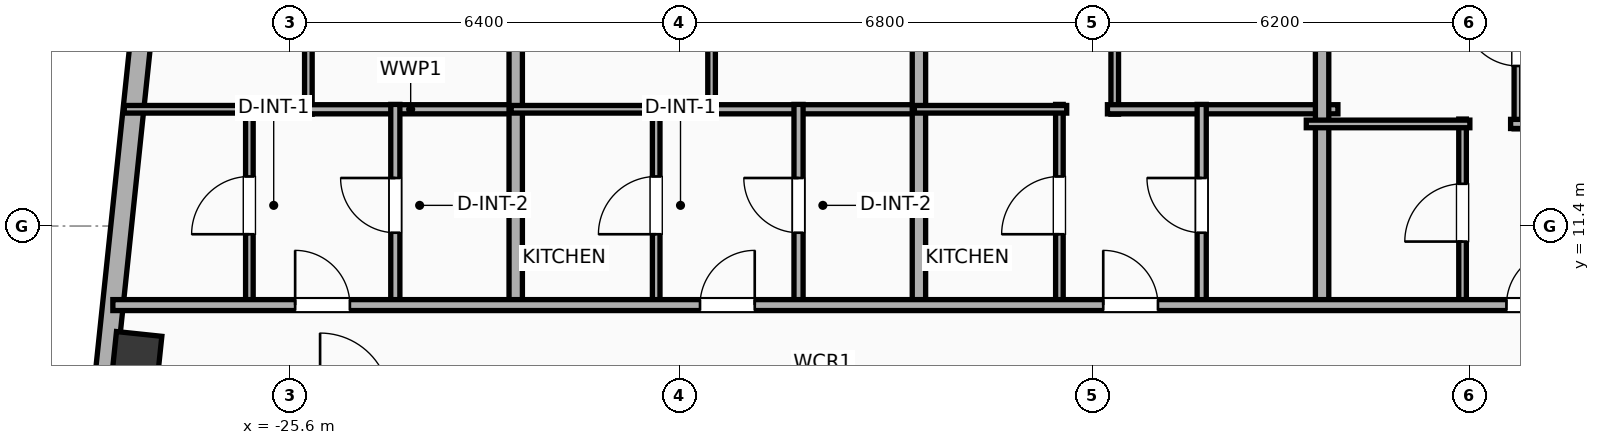
"""IFC4 building model, lengths in metres.
Left out: names, types, materials, properties, quantities, classifications, styles, units other than length and angle.
Written with IfcOpenShell. Run it as: python <this file> out.ifc"""

import sys

from ifc_helpers import new_model, si_unit, direction, frame, frame_2d, origin, origin_2d, place, context, subcontext, project, spatial, rectangle, hollow_rectangle, extrude, element, fill, save


model = new_model("IFC4")
c1 = context("Model", 3, precision=1e-05, world=origin(), true_north=direction((0.0, 1.0)))
c2 = subcontext(c1, "Body", "Model", "MODEL_VIEW")
j1 = project(units=[si_unit("LENGTHUNIT", "METRE"), si_unit("PLANEANGLEUNIT", "RADIAN")], contexts=[c1])
p1 = place(None, origin())
s1 = spatial("IfcSite", under=j1, at=p1, CompositionType="ELEMENT")
p2 = place(p1, origin())
s2 = spatial("IfcBuilding", under=s1, at=p2, CompositionType="ELEMENT")
p3 = place(p2, frame((0.0, 0.0, 299.0)))
s3 = spatial("IfcBuildingStorey", under=s2, at=p3, CompositionType="ELEMENT", Elevation=299.0)
p4 = place(p3, frame((-28.123, 9.252, 0.0), z_axis=(0.0, 0.0, 1.0), x_axis=(0.994521895368, -0.104528463268, 0.0)))
e1 = element("IfcColumn", 1, at=p4, inside=s3, PredefinedType="COLUMN", context=c2, shape_type="SweptSolid", body=[
    extrude(hollow_rectangle(XDim=0.75, YDim=0.75, WallThickness=0.025, at=origin_2d()), origin(), (0.0, 0.0, 1.0), 3.9),
])
p5 = place(p3, frame((-30.87, -12.296, 0.0), z_axis=(0.0, 0.0, 1.0), x_axis=(0.104533282919, 0.994521388791, 0.0)))
e2 = element("IfcWall", 2, at=p5, inside=s3, PredefinedType="ELEMENTEDWALL", context=c2, shape_type="SweptSolid", body=[
    extrude(rectangle(XDim=30.366, YDim=0.34, at=frame_2d((15.183, 0.0))), origin(), (0.0, 0.0, 1.0), 3.635),
])
p6 = place(p5, frame((5.442, 0.0, 0.65)))
e3 = element("IfcOpeningElement", 3, at=p6, cuts=e2, PredefinedType="OPENING", context=c2, shape_type="SweptSolid", body=[
    extrude(rectangle(XDim=2.6, YDim=2.45, at=frame_2d((1.3, 1.225))), frame((0.0, 0.18, 0.0), z_axis=(0.0, -1.0, 0.0), x_axis=(1.0, 0.0, 0.0)), (0.0, 0.0, 1.0), 0.36),
])
p7 = place(p5, frame((27.017, 0.0, 0.75)))
e4 = element("IfcOpeningElement", 4, at=p7, cuts=e2, PredefinedType="OPENING", context=c2, shape_type="SweptSolid", body=[
    extrude(rectangle(XDim=1.2, YDim=2.05, at=frame_2d((0.6, 1.025))), frame((0.0, 0.18, 0.0), z_axis=(0.0, -1.0, 0.0), x_axis=(1.0, 0.0, 0.0)), (0.0, 0.0, 1.0), 0.36),
])
p8 = place(p5, frame((16.135, 0.0, 0.75)))
e5 = element("IfcOpeningElement", 5, at=p8, cuts=e2, PredefinedType="OPENING", context=c2, shape_type="SweptSolid", body=[
    extrude(rectangle(XDim=1.2, YDim=2.05, at=frame_2d((0.6, 1.025))), frame((0.0, 0.18, 0.0), z_axis=(0.0, -1.0, 0.0), x_axis=(1.0, 0.0, 0.0)), (0.0, 0.0, 1.0), 0.36),
])
p9 = place(p3, frame((-25.301, 13.24, 0.0), z_axis=(0.0, 0.0, 1.0), x_axis=(0.0, 1.0, 0.0)))
e6 = element("IfcWall", 6, at=p9, inside=s3, PredefinedType="PARTITIONING", context=c2, shape_type="SweptSolid", body=[
    extrude(rectangle(XDim=7.751, YDim=0.125, at=frame_2d((3.875, 0.0))), origin(), (0.0, 0.0, 1.0), 3.635),
])
p10 = place(p9, frame((1.41, 0.0, 0.0)))
e7 = element("IfcOpeningElement", 7, at=p10, cuts=e6, PredefinedType="OPENING", context=c2, shape_type="SweptSolid", body=[
    extrude(rectangle(XDim=0.9, YDim=2.05, at=frame_2d((0.45, 1.025))), frame((0.0, 0.073, 0.0), z_axis=(0.0, -1.0, 0.0), x_axis=(1.0, 0.0, 0.0)), (0.0, 0.0, 1.0), 0.145),
])
p11 = place(p3, frame((-25.421, 13.32, 0.0), z_axis=(0.0, 0.0, 1.0), x_axis=(1.0, 0.0, 0.0)))
e8 = element("IfcWall", 8, at=p11, inside=s3, PredefinedType="PLUMBINGWALL", context=c2, shape_type="SweptSolid", body=[
    extrude(rectangle(XDim=3.605, YDim=0.15, at=frame_2d((1.802, 0.0))), origin(), (0.0, 0.0, 1.0), 3.635),
])
p12 = place(p3, frame((-26.271, 10.08, 0.0), z_axis=(0.0, 0.0, 1.0), x_axis=(0.0, 1.0, 0.0)))
e9 = element("IfcWall", 9, at=p12, inside=s3, PredefinedType="PARTITIONING", context=c2, shape_type="SweptSolid", body=[
    extrude(rectangle(XDim=3.32, YDim=0.125, at=frame_2d((1.66, 0.0))), origin(), (0.0, 0.0, 1.0), 3.635),
])
p13 = place(p12, frame((1.185, 0.0, 0.0)))
e10 = element("IfcOpeningElement", 10, at=p13, cuts=e9, PredefinedType="OPENING", context=c2, shape_type="SweptSolid", body=[
    extrude(rectangle(XDim=0.95, YDim=2.05, at=frame_2d((0.475, 1.025))), frame((0.0, 0.073, 0.0), z_axis=(0.0, -1.0, 0.0), x_axis=(1.0, 0.0, 0.0)), (0.0, 0.0, 1.0), 0.145),
])
p14 = place(p3, frame((-28.329, 13.32, 0.0), z_axis=(0.0, 0.0, 1.0), x_axis=(1.0, 0.0, 0.0)))
e11 = element("IfcWall", 11, at=p14, inside=s3, PredefinedType="PARTITIONING", context=c2, shape_type="SweptSolid", body=[
    extrude(rectangle(XDim=2.178, YDim=0.125, at=frame_2d((1.089, 0.0))), origin(), (0.0, 0.0, 1.0), 3.635),
])
p15 = place(p3, frame((-23.871, 10.08, 0.0), z_axis=(0.0, 0.0, 1.0), x_axis=(0.0, 1.0, 0.0)))
e12 = element("IfcWall", 12, at=p15, inside=s3, PredefinedType="PLUMBINGWALL", context=c2, shape_type="SweptSolid", body=[
    extrude(rectangle(XDim=3.32, YDim=0.15, at=frame_2d((1.66, 0.0))), origin(), (0.0, 0.0, 1.0), 3.635),
])
p16 = place(p15, frame((1.21, 0.0, 0.0)))
e13 = element("IfcOpeningElement", 13, at=p16, cuts=e12, PredefinedType="OPENING", context=c2, shape_type="SweptSolid", body=[
    extrude(rectangle(XDim=0.9, YDim=2.05, at=frame_2d((0.45, 1.025))), frame((0.0, 0.085, 0.0), z_axis=(0.0, -1.0, 0.0), x_axis=(1.0, 0.0, 0.0)), (0.0, 0.0, 1.0), 0.17),
])
p17 = place(p3, frame((-21.891, 10.02, 0.0), z_axis=(0.0, 0.0, 1.0), x_axis=(0.0, 1.0, 0.0)))
e14 = element("IfcWall", 14, at=p17, inside=s3, PredefinedType="PARTITIONING", context=c2, shape_type="SweptSolid", body=[
    extrude(rectangle(XDim=10.74, YDim=0.22, at=frame_2d((5.37, 0.0))), origin(), (0.0, 0.0, 1.0), 3.075),
])
p18 = place(p3, frame((-18.67, 13.24, 0.0), z_axis=(0.0, 0.0, 1.0), x_axis=(0.0, 1.0, 0.0)))
e15 = element("IfcWall", 15, at=p18, inside=s3, PredefinedType="PARTITIONING", context=c2, shape_type="SweptSolid", body=[
    extrude(rectangle(XDim=7.333, YDim=0.125, at=frame_2d((3.666, 0.0))), origin(), (0.0, 0.0, 1.0), 3.635),
])
p19 = place(p18, frame((1.31, 0.0, 0.0)))
e16 = element("IfcOpeningElement", 16, at=p19, cuts=e15, PredefinedType="OPENING", context=c2, shape_type="SweptSolid", body=[
    extrude(rectangle(XDim=0.9, YDim=2.05, at=frame_2d((0.45, 1.025))), frame((0.0, 0.073, 0.0), z_axis=(0.0, -1.0, 0.0), x_axis=(1.0, 0.0, 0.0)), (0.0, 0.0, 1.0), 0.145),
])
p20 = place(p3, frame((-18.79, 13.32, 0.0), z_axis=(0.0, 0.0, 1.0), x_axis=(1.0, 0.0, 0.0)))
e17 = element("IfcWall", 17, at=p20, inside=s3, PredefinedType="PLUMBINGWALL", context=c2, shape_type="SweptSolid", body=[
    extrude(rectangle(XDim=3.605, YDim=0.15, at=frame_2d((1.802, 0.0))), origin(), (0.0, 0.0, 1.0), 3.635),
])
p21 = place(p3, frame((-19.581, 10.08, 0.0), z_axis=(0.0, 0.0, 1.0), x_axis=(0.0, 1.0, 0.0)))
e18 = element("IfcWall", 18, at=p21, inside=s3, PredefinedType="PARTITIONING", context=c2, shape_type="SweptSolid", body=[
    extrude(rectangle(XDim=3.32, YDim=0.125, at=frame_2d((1.66, 0.0))), origin(), (0.0, 0.0, 1.0), 3.635),
])
p22 = place(p21, frame((1.185, 0.0, 0.0)))
e19 = element("IfcOpeningElement", 19, at=p22, cuts=e18, PredefinedType="OPENING", context=c2, shape_type="SweptSolid", body=[
    extrude(rectangle(XDim=0.95, YDim=2.05, at=frame_2d((0.475, 1.025))), frame((0.0, 0.073, 0.0), z_axis=(0.0, -1.0, 0.0), x_axis=(1.0, 0.0, 0.0)), (0.0, 0.0, 1.0), 0.145),
])
p23 = place(p3, frame((-21.966, 13.32, 0.0), z_axis=(0.0, 0.0, 1.0), x_axis=(1.0, 0.0, 0.0)))
e20 = element("IfcWall", 20, at=p23, inside=s3, PredefinedType="PARTITIONING", context=c2, shape_type="SweptSolid", body=[
    extrude(rectangle(XDim=2.505, YDim=0.125, at=frame_2d((1.252, 0.0))), origin(), (0.0, 0.0, 1.0), 3.635),
])
p24 = place(p3, frame((-17.24, 10.08, 0.0), z_axis=(0.0, 0.0, 1.0), x_axis=(0.0, 1.0, 0.0)))
e21 = element("IfcWall", 21, at=p24, inside=s3, PredefinedType="PLUMBINGWALL", context=c2, shape_type="SweptSolid", body=[
    extrude(rectangle(XDim=3.32, YDim=0.15, at=frame_2d((1.66, 0.0))), origin(), (0.0, 0.0, 1.0), 3.635),
])
p25 = place(p24, frame((1.21, 0.0, 0.0)))
e22 = element("IfcOpeningElement", 22, at=p25, cuts=e21, PredefinedType="OPENING", context=c2, shape_type="SweptSolid", body=[
    extrude(rectangle(XDim=0.9, YDim=2.05, at=frame_2d((0.45, 1.025))), frame((0.0, 0.085, 0.0), z_axis=(0.0, -1.0, 0.0), x_axis=(1.0, 0.0, 0.0)), (0.0, 0.0, 1.0), 0.17),
])
p26 = place(p3, frame((-15.26, 10.02, 0.0), z_axis=(0.0, 0.0, 1.0), x_axis=(0.0, 1.0, 0.0)))
e23 = element("IfcWall", 23, at=p26, inside=s3, PredefinedType="PARTITIONING", context=c2, shape_type="SweptSolid", body=[
    extrude(rectangle(XDim=10.043, YDim=0.22, at=frame_2d((5.021, 0.0))), origin(), (0.0, 0.0, 1.0), 3.075),
])
p27 = place(p3, frame((-12.04, 13.24, 0.0), z_axis=(0.0, 0.0, 1.0), x_axis=(0.0, 1.0, 0.0)))
e24 = element("IfcWall", 24, at=p27, inside=s3, PredefinedType="PARTITIONING", context=c2, shape_type="SweptSolid", body=[
    extrude(rectangle(XDim=6.635, YDim=0.125, at=frame_2d((3.318, 0.0))), origin(), (0.0, 0.0, 1.0), 3.635),
])
p28 = place(p27, frame((1.143, 0.0, 0.0)))
e25 = element("IfcOpeningElement", 25, at=p28, cuts=e24, PredefinedType="OPENING", context=c2, shape_type="SweptSolid", body=[
    extrude(rectangle(XDim=0.9, YDim=2.05, at=frame_2d((0.45, 1.025))), frame((0.0, 0.073, 0.0), z_axis=(0.0, -1.0, 0.0), x_axis=(1.0, 0.0, 0.0)), (0.0, 0.0, 1.0), 0.145),
])
p29 = place(p3, frame((-12.16, 13.32, 0.0), z_axis=(0.0, 0.0, 1.0), x_axis=(1.0, 0.0, 0.0)))
e26 = element("IfcWall", 26, at=p29, inside=s3, PredefinedType="PLUMBINGWALL", context=c2, shape_type="SweptSolid", body=[
    extrude(rectangle(XDim=3.79, YDim=0.15, at=frame_2d((1.895, 0.0))), origin(), (0.0, 0.0, 1.0), 3.635),
])
p30 = place(p3, frame((-12.95, 10.08, 0.0), z_axis=(0.0, 0.0, 1.0), x_axis=(0.0, 1.0, 0.0)))
e27 = element("IfcWall", 27, at=p30, inside=s3, PredefinedType="PARTITIONING", context=c2, shape_type="SweptSolid", body=[
    extrude(rectangle(XDim=3.32, YDim=0.125, at=frame_2d((1.66, 0.0))), origin(), (0.0, 0.0, 1.0), 3.635),
])
p31 = place(p30, frame((1.185, 0.0, 0.0)))
e28 = element("IfcOpeningElement", 28, at=p31, cuts=e27, PredefinedType="OPENING", context=c2, shape_type="SweptSolid", body=[
    extrude(rectangle(XDim=0.95, YDim=2.05, at=frame_2d((0.475, 1.025))), frame((0.0, 0.073, 0.0), z_axis=(0.0, -1.0, 0.0), x_axis=(1.0, 0.0, 0.0)), (0.0, 0.0, 1.0), 0.145),
])
p32 = place(p3, frame((-15.335, 13.32, 0.0), z_axis=(0.0, 0.0, 1.0), x_axis=(1.0, 0.0, 0.0)))
e29 = element("IfcWall", 29, at=p32, inside=s3, PredefinedType="PARTITIONING", context=c2, shape_type="SweptSolid", body=[
    extrude(rectangle(XDim=2.505, YDim=0.125, at=frame_2d((1.252, 0.0))), origin(), (0.0, 0.0, 1.0), 3.635),
])
p33 = place(p3, frame((-10.61, 10.08, 0.0), z_axis=(0.0, 0.0, 1.0), x_axis=(0.0, 1.0, 0.0)))
e30 = element("IfcWall", 30, at=p33, inside=s3, PredefinedType="PLUMBINGWALL", context=c2, shape_type="SweptSolid", body=[
    extrude(rectangle(XDim=3.32, YDim=0.15, at=frame_2d((1.66, 0.0))), origin(), (0.0, 0.0, 1.0), 3.635),
])
p34 = place(p33, frame((1.21, 0.0, 0.0)))
e31 = element("IfcOpeningElement", 31, at=p34, cuts=e30, PredefinedType="OPENING", context=c2, shape_type="SweptSolid", body=[
    extrude(rectangle(XDim=0.9, YDim=2.05, at=frame_2d((0.45, 1.025))), frame((0.0, 0.085, 0.0), z_axis=(0.0, -1.0, 0.0), x_axis=(1.0, 0.0, 0.0)), (0.0, 0.0, 1.0), 0.17),
])
p35 = place(p3, frame((-8.63, 10.02, 0.0), z_axis=(0.0, 0.0, 1.0), x_axis=(0.0, 1.0, 0.0)))
e32 = element("IfcWall", 32, at=p35, inside=s3, PredefinedType="PARTITIONING", context=c2, shape_type="SweptSolid", body=[
    extrude(rectangle(XDim=9.346, YDim=0.22, at=frame_2d((4.673, 0.0))), origin(), (0.0, 0.0, 1.0), 3.635),
])
p36 = place(p3, frame((-5.41, 12.999, 0.0), z_axis=(0.0, 0.0, 1.0), x_axis=(0.0, 1.0, 0.0)))
e33 = element("IfcWall", 33, at=p36, inside=s3, PredefinedType="PARTITIONING", context=c2, shape_type="SweptSolid", body=[
    extrude(rectangle(XDim=6.18, YDim=0.125, at=frame_2d((3.09, 0.0))), origin(), (0.0, 0.0, 1.0), 3.075),
])
p37 = place(p36, frame((1.033, 0.0, 0.0)))
e34 = element("IfcOpeningElement", 34, at=p37, cuts=e33, PredefinedType="OPENING", context=c2, shape_type="SweptSolid", body=[
    extrude(rectangle(XDim=0.9, YDim=2.05, at=frame_2d((0.45, 1.025))), frame((0.0, 0.073, 0.0), z_axis=(0.0, -1.0, 0.0), x_axis=(1.0, 0.0, 0.0)), (0.0, 0.0, 1.0), 0.145),
])
p38 = place(p3, frame((-5.53, 13.079, 0.0), z_axis=(0.0, 0.0, 1.0), x_axis=(1.0, 0.0, 0.0)))
e35 = element("IfcWall", 35, at=p38, inside=s3, PredefinedType="PLUMBINGWALL", context=c2, shape_type="SweptSolid", body=[
    extrude(rectangle(XDim=3.79, YDim=0.15, at=frame_2d((1.895, 0.0))), origin(), (0.0, 0.0, 1.0), 3.635),
])
p39 = place(p3, frame((-6.32, 10.08, 0.0), z_axis=(0.0, 0.0, 1.0), x_axis=(0.0, 1.0, 0.0)))
e36 = element("IfcWall", 36, at=p39, inside=s3, PredefinedType="PARTITIONING", context=c2, shape_type="SweptSolid", body=[
    extrude(rectangle(XDim=3.079, YDim=0.125, at=frame_2d((1.54, 0.0))), origin(), (0.0, 0.0, 1.0), 3.635),
])
p40 = place(p39, frame((1.064, 0.0, 0.0)))
e37 = element("IfcOpeningElement", 37, at=p40, cuts=e36, PredefinedType="OPENING", context=c2, shape_type="SweptSolid", body=[
    extrude(rectangle(XDim=0.95, YDim=2.05, at=frame_2d((0.475, 1.025))), frame((0.0, 0.073, 0.0), z_axis=(0.0, -1.0, 0.0), x_axis=(1.0, 0.0, 0.0)), (0.0, 0.0, 1.0), 0.145),
])
p41 = place(p3, frame((-8.89, 13.079, 0.0), z_axis=(0.0, 0.0, 1.0), x_axis=(1.0, 0.0, 0.0)))
e38 = element("IfcWall", 38, at=p41, inside=s3, PredefinedType="PARTITIONING", context=c2, shape_type="SweptSolid", body=[
    extrude(rectangle(XDim=2.69, YDim=0.125, at=frame_2d((1.345, 0.0))), origin(), (0.0, 0.0, 1.0), 3.635),
])
p42 = place(p3, frame((-28.516, 10.1, 0.0), z_axis=(0.0, 0.0, 1.0), x_axis=(1.0, 0.0, 0.0)))
e39 = element("IfcWall", 39, at=p42, inside=s3, PredefinedType="PARTITIONING", context=c2, shape_type="SweptSolid", body=[
    extrude(rectangle(XDim=53.955, YDim=0.18, at=frame_2d((26.978, 0.0))), origin(), (0.0, 0.0, 1.0), 3.635),
])
p43 = place(p42, frame((2.998, 0.0, 0.0)))
e40 = element("IfcOpeningElement", 40, at=p43, cuts=e39, PredefinedType="OPENING", context=c2, shape_type="SweptSolid", body=[
    extrude(rectangle(XDim=0.9, YDim=2.05, at=frame_2d((0.45, 1.025))), frame((0.0, 0.1, 0.0), z_axis=(0.0, -1.0, 0.0), x_axis=(1.0, 0.0, 0.0)), (0.0, 0.0, 1.0), 0.2),
])
p44 = place(p42, frame((9.656, 0.0, 0.0)))
e41 = element("IfcOpeningElement", 41, at=p44, cuts=e39, PredefinedType="OPENING", context=c2, shape_type="SweptSolid", body=[
    extrude(rectangle(XDim=0.9, YDim=2.05, at=frame_2d((0.45, 1.025))), frame((0.0, 0.1, 0.0), z_axis=(0.0, -1.0, 0.0), x_axis=(1.0, 0.0, 0.0)), (0.0, 0.0, 1.0), 0.2),
])
p45 = place(p42, frame((16.287, 0.0, 0.0)))
e42 = element("IfcOpeningElement", 42, at=p45, cuts=e39, PredefinedType="OPENING", context=c2, shape_type="SweptSolid", body=[
    extrude(rectangle(XDim=0.9, YDim=2.05, at=frame_2d((0.45, 1.025))), frame((0.0, 0.1, 0.0), z_axis=(0.0, -1.0, 0.0), x_axis=(1.0, 0.0, 0.0)), (0.0, 0.0, 1.0), 0.2),
])
p46 = place(p42, frame((22.918, 0.0, 0.0)))
e43 = element("IfcOpeningElement", 43, at=p46, cuts=e39, PredefinedType="OPENING", context=c2, shape_type="SweptSolid", body=[
    extrude(rectangle(XDim=0.9, YDim=2.05, at=frame_2d((0.45, 1.025))), frame((0.0, 0.1, 0.0), z_axis=(0.0, -1.0, 0.0), x_axis=(1.0, 0.0, 0.0)), (0.0, 0.0, 1.0), 0.2),
])
p47 = place(p42, frame((29.689, 0.0, 0.0)))
e44 = element("IfcOpeningElement", 44, at=p47, cuts=e39, PredefinedType="OPENING", context=c2, shape_type="SweptSolid", body=[
    extrude(rectangle(XDim=0.9, YDim=2.05, at=frame_2d((0.45, 1.025))), frame((0.0, 0.1, 0.0), z_axis=(0.0, -1.0, 0.0), x_axis=(1.0, 0.0, 0.0)), (0.0, 0.0, 1.0), 0.2),
])
p48 = place(p42, frame((36.612, 0.0, 0.0)))
e45 = element("IfcOpeningElement", 45, at=p48, cuts=e39, PredefinedType="OPENING", context=c2, shape_type="SweptSolid", body=[
    extrude(rectangle(XDim=0.9, YDim=2.05, at=frame_2d((0.45, 1.025))), frame((0.0, 0.1, 0.0), z_axis=(0.0, -1.0, 0.0), x_axis=(1.0, 0.0, 0.0)), (0.0, 0.0, 1.0), 0.2),
])
p49 = place(p42, frame((43.529, 0.0, 0.0)))
e46 = element("IfcOpeningElement", 46, at=p49, cuts=e39, PredefinedType="OPENING", context=c2, shape_type="SweptSolid", body=[
    extrude(rectangle(XDim=0.9, YDim=2.05, at=frame_2d((0.45, 1.025))), frame((0.0, 0.1, 0.0), z_axis=(0.0, -1.0, 0.0), x_axis=(1.0, 0.0, 0.0)), (0.0, 0.0, 1.0), 0.2),
])
p50 = place(p42, frame((50.452, 0.0, 0.0)))
e47 = element("IfcOpeningElement", 47, at=p50, cuts=e39, PredefinedType="OPENING", context=c2, shape_type="SweptSolid", body=[
    extrude(rectangle(XDim=0.9, YDim=2.05, at=frame_2d((0.45, 1.025))), frame((0.0, 0.1, 0.0), z_axis=(0.0, -1.0, 0.0), x_axis=(1.0, 0.0, 0.0)), (0.0, 0.0, 1.0), 0.2),
])
p51 = place(p13, origin())
e48 = element("IfcDoor", 48, at=p51, inside=s3, OperationType="SINGLE_SWING_LEFT", PredefinedType="DOOR", context=c2, shape_type="SweptSolid", body=[
    extrude(rectangle(XDim=0.95, YDim=2.05, at=frame_2d((0.475, 1.025))), frame((0.0, 0.025, 0.0), z_axis=(0.0, -1.0, 0.0), x_axis=(1.0, 0.0, 0.0)), (0.0, 0.0, 1.0), 0.05),
])
fill(e10, e48)
p52 = place(p16, origin())
e49 = element("IfcDoor", 49, at=p52, inside=s3, OperationType="SINGLE_SWING_RIGHT", PredefinedType="DOOR", context=c2, shape_type="SweptSolid", body=[
    extrude(rectangle(XDim=0.9, YDim=2.05, at=frame_2d((0.45, 1.025))), frame((0.0, 0.025, 0.0), z_axis=(0.0, -1.0, 0.0), x_axis=(1.0, 0.0, 0.0)), (0.0, 0.0, 1.0), 0.05),
])
fill(e13, e49)
p53 = place(p22, origin())
e50 = element("IfcDoor", 50, at=p53, inside=s3, OperationType="SINGLE_SWING_LEFT", PredefinedType="DOOR", context=c2, shape_type="SweptSolid", body=[
    extrude(rectangle(XDim=0.95, YDim=2.05, at=frame_2d((0.475, 1.025))), frame((0.0, 0.025, 0.0), z_axis=(0.0, -1.0, 0.0), x_axis=(1.0, 0.0, 0.0)), (0.0, 0.0, 1.0), 0.05),
])
fill(e19, e50)
p54 = place(p25, origin())
e51 = element("IfcDoor", 51, at=p54, inside=s3, OperationType="SINGLE_SWING_RIGHT", PredefinedType="DOOR", context=c2, shape_type="SweptSolid", body=[
    extrude(rectangle(XDim=0.9, YDim=2.05, at=frame_2d((0.45, 1.025))), frame((0.0, 0.025, 0.0), z_axis=(0.0, -1.0, 0.0), x_axis=(1.0, 0.0, 0.0)), (0.0, 0.0, 1.0), 0.05),
])
fill(e22, e51)
p55 = place(p31, origin())
e52 = element("IfcDoor", 52, at=p55, inside=s3, OperationType="SINGLE_SWING_LEFT", PredefinedType="DOOR", context=c2, shape_type="SweptSolid", body=[
    extrude(rectangle(XDim=0.95, YDim=2.05, at=frame_2d((0.475, 1.025))), frame((0.0, 0.025, 0.0), z_axis=(0.0, -1.0, 0.0), x_axis=(1.0, 0.0, 0.0)), (0.0, 0.0, 1.0), 0.05),
])
fill(e28, e52)
p56 = place(p34, origin())
e53 = element("IfcDoor", 53, at=p56, inside=s3, OperationType="SINGLE_SWING_RIGHT", PredefinedType="DOOR", context=c2, shape_type="SweptSolid", body=[
    extrude(rectangle(XDim=0.9, YDim=2.05, at=frame_2d((0.45, 1.025))), frame((0.0, 0.025, 0.0), z_axis=(0.0, -1.0, 0.0), x_axis=(1.0, 0.0, 0.0)), (0.0, 0.0, 1.0), 0.05),
])
fill(e31, e53)
p57 = place(p37, origin())
e54 = element("IfcDoor", 54, at=p57, inside=s3, OperationType="SINGLE_SWING_RIGHT", PredefinedType="DOOR", context=c2, shape_type="SweptSolid", body=[
    extrude(rectangle(XDim=0.9, YDim=2.05, at=frame_2d((0.45, 1.025))), frame((0.0, 0.025, 0.0), z_axis=(0.0, -1.0, 0.0), x_axis=(1.0, 0.0, 0.0)), (0.0, 0.0, 1.0), 0.05),
])
fill(e34, e54)
p58 = place(p40, origin())
e55 = element("IfcDoor", 55, at=p58, inside=s3, OperationType="SINGLE_SWING_LEFT", PredefinedType="DOOR", context=c2, shape_type="SweptSolid", body=[
    extrude(rectangle(XDim=0.95, YDim=2.05, at=frame_2d((0.475, 1.025))), frame((0.0, 0.025, 0.0), z_axis=(0.0, -1.0, 0.0), x_axis=(1.0, 0.0, 0.0)), (0.0, 0.0, 1.0), 0.05),
])
fill(e37, e55)
p59 = place(p43, origin())
e56 = element("IfcDoor", 56, at=p59, inside=s3, OperationType="SINGLE_SWING_LEFT", PredefinedType="DOOR", context=c2, shape_type="SweptSolid", body=[
    extrude(rectangle(XDim=0.9, YDim=2.05, at=frame_2d((0.45, 1.025))), frame((0.0, 0.025, 0.0), z_axis=(0.0, -1.0, 0.0), x_axis=(1.0, 0.0, 0.0)), (0.0, 0.0, 1.0), 0.05),
])
fill(e40, e56)
p60 = place(p44, origin())
e57 = element("IfcDoor", 57, at=p60, inside=s3, OperationType="SINGLE_SWING_RIGHT", PredefinedType="DOOR", context=c2, shape_type="SweptSolid", body=[
    extrude(rectangle(XDim=0.9, YDim=2.05, at=frame_2d((0.45, 1.025))), frame((0.0, 0.025, 0.0), z_axis=(0.0, -1.0, 0.0), x_axis=(1.0, 0.0, 0.0)), (0.0, 0.0, 1.0), 0.05),
])
fill(e41, e57)
p61 = place(p45, origin())
e58 = element("IfcDoor", 58, at=p61, inside=s3, OperationType="SINGLE_SWING_LEFT", PredefinedType="DOOR", context=c2, shape_type="SweptSolid", body=[
    extrude(rectangle(XDim=0.9, YDim=2.05, at=frame_2d((0.45, 1.025))), frame((0.0, 0.025, 0.0), z_axis=(0.0, -1.0, 0.0), x_axis=(1.0, 0.0, 0.0)), (0.0, 0.0, 1.0), 0.05),
])
fill(e42, e58)
p62 = place(p46, origin())
e59 = element("IfcDoor", 59, at=p62, inside=s3, OperationType="SINGLE_SWING_RIGHT", PredefinedType="DOOR", context=c2, shape_type="SweptSolid", body=[
    extrude(rectangle(XDim=0.9, YDim=2.05, at=frame_2d((0.45, 1.025))), frame((0.0, 0.025, 0.0), z_axis=(0.0, -1.0, 0.0), x_axis=(1.0, 0.0, 0.0)), (0.0, 0.0, 1.0), 0.05),
])
fill(e43, e59)
save(model, sys.argv[1])
